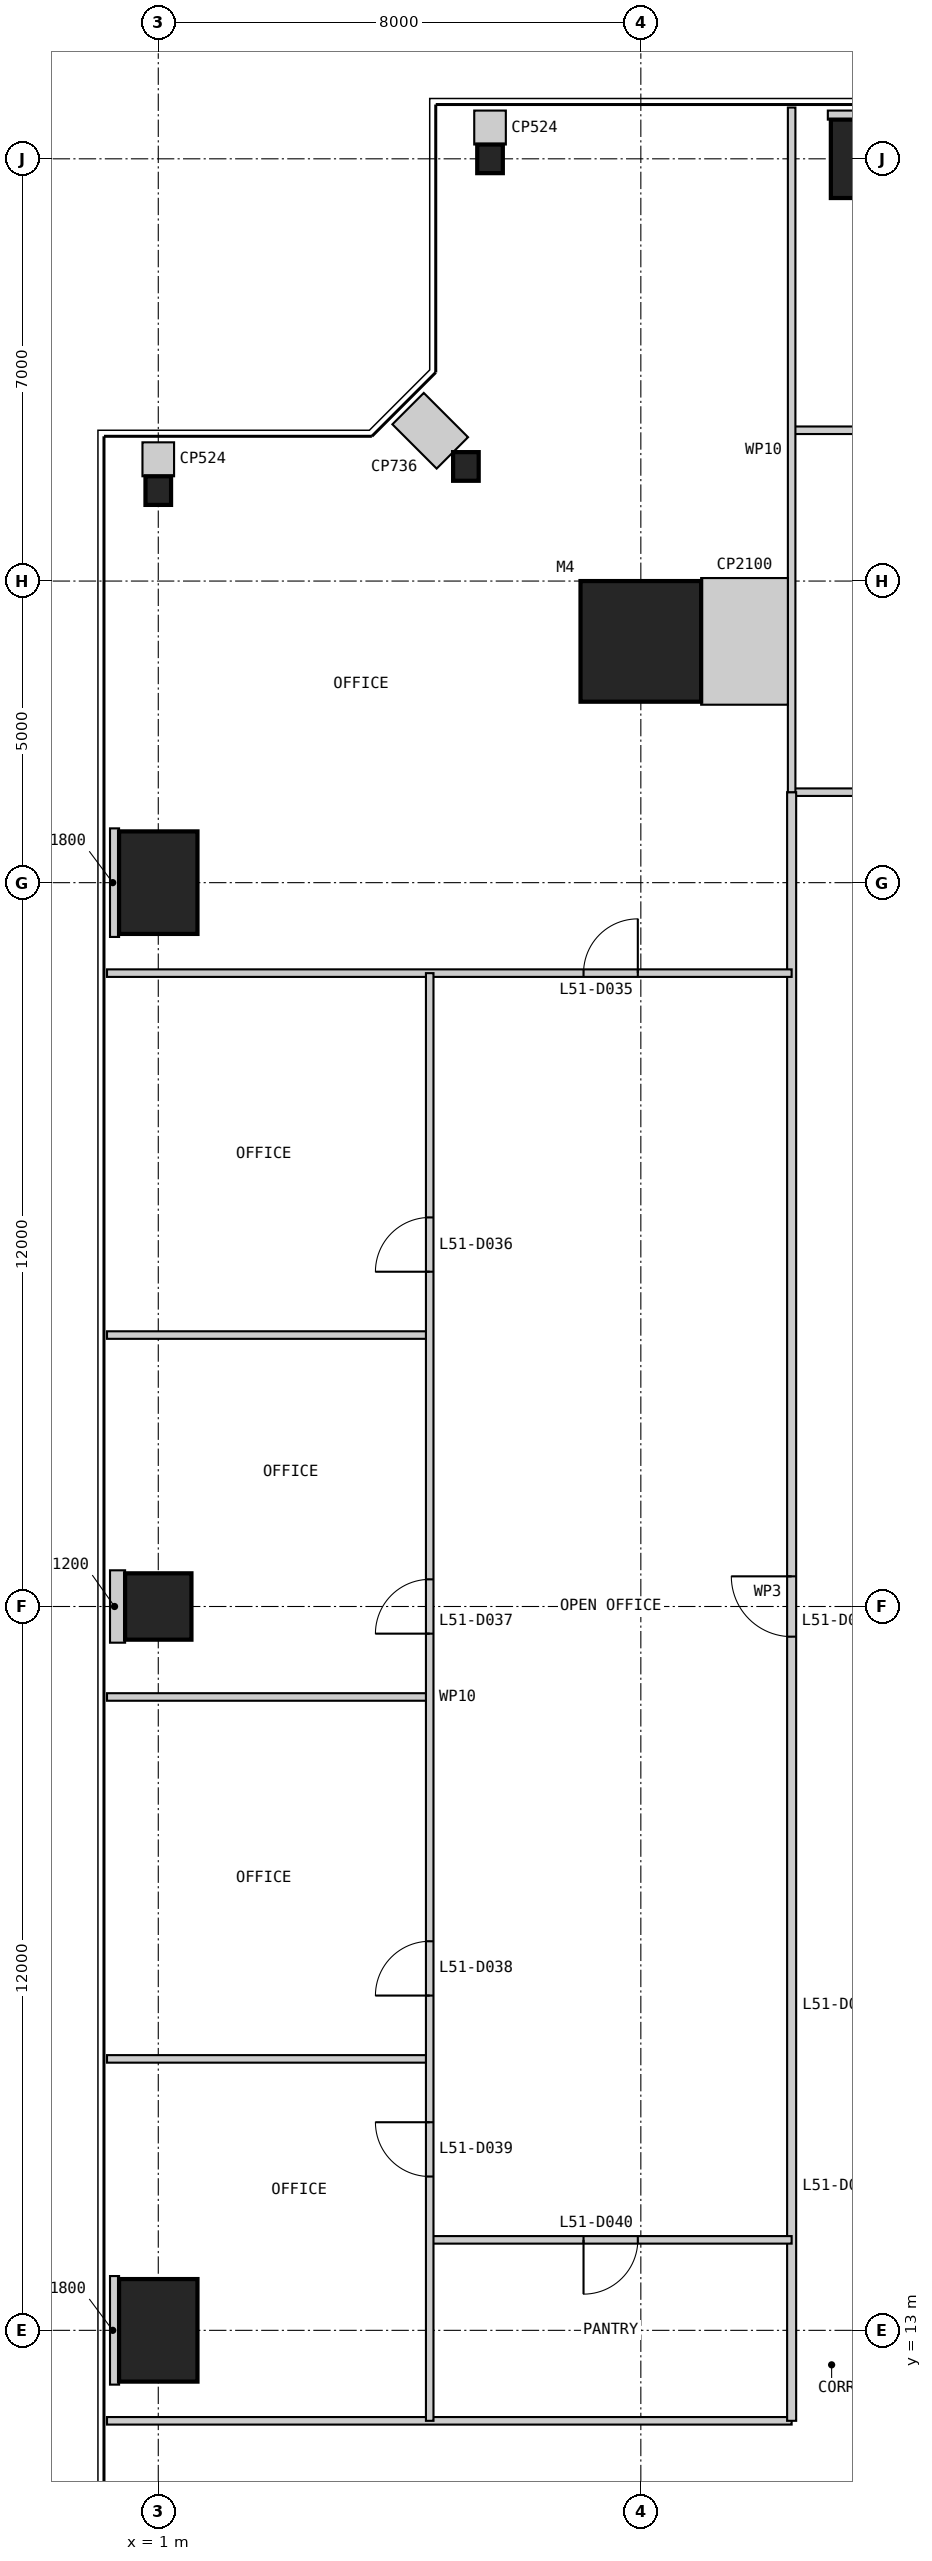
"""IFC4 building model, lengths in metres.
Left out: names, types, materials, properties, quantities, classifications, styles, units other than length and angle.
Written with IfcOpenShell. Run it as: python <this file> out.ifc"""

import sys

from ifc_helpers import new_model, si_unit, direction, frame, frame_2d, origin, origin_2d, place, context, subcontext, project, spatial, rectangle, i_section, extrude, element, fill, save


model = new_model("IFC4")
c1 = context("Model", 3, precision=1e-05, world=origin(), true_north=direction((0.0, 1.0)))
c2 = subcontext(c1, "Body", "Model", "MODEL_VIEW")
j1 = project(units=[si_unit("LENGTHUNIT", "METRE"), si_unit("PLANEANGLEUNIT", "RADIAN")], contexts=[c1])
p1 = place(None, origin())
s1 = spatial("IfcSite", under=j1, at=p1, CompositionType="ELEMENT")
p2 = place(p1, origin())
s2 = spatial("IfcBuilding", under=s1, at=p2, CompositionType="ELEMENT")
p3 = place(p2, frame((0.0, 0.0, 217.8)))
s3 = spatial("IfcBuildingStorey", under=s2, at=p3, CompositionType="ELEMENT", Elevation=217.8)
p4 = place(p3, frame((9.0, 41.0, 0.0), z_axis=(0.0, 0.0, 1.0), x_axis=(1.0, 0.0, 0.0)))
e1 = element("IfcColumn", 1, at=p4, inside=s3, PredefinedType="COLUMN", context=c2, shape_type="SweptSolid", body=[
    extrude(rectangle(XDim=2.0, YDim=2.0, at=origin_2d()), origin(), (0.0, 0.0, 1.0), 4.0),
])
p5 = place(p3, frame((13.0, 49.0, 0.0), z_axis=(0.0, 0.0, 1.0), x_axis=(1.0, 0.0, 0.0)))
e2 = element("IfcColumn", 2, at=p5, inside=s3, PredefinedType="COLUMN", context=c2, shape_type="SweptSolid", body=[
    extrude(rectangle(XDim=1.7, YDim=1.3, at=origin_2d()), origin(), (0.0, 0.0, 1.0), 4.0),
])
for number, where, z_axis, x_axis in (
    (3, (6.5, 49.0, 0.0), (0.0, 0.0, 1.0), (1.0, 0.0, 0.0)),
    (4, (6.1, 43.9, 0.0), (0.0, 0.0, 1.0), (1.0, 0.0, 0.0)),
    (5, (1.0, 43.5, 0.0), (0.0, 0.0, 1.0), (1.0, 0.0, 0.0)),
):
    element("IfcColumn", number, at=place(p3, frame(where, z_axis=z_axis, x_axis=x_axis)), inside=s3, PredefinedType="COLUMN", context=c2, shape_type="SweptSolid", body=[
        extrude(i_section(OverallWidth=0.424, OverallDepth=0.475, WebThickness=0.048, FlangeThickness=0.077, at=origin_2d()), origin(), (0.0, 0.0, 1.0), 4.0),
    ])
p6 = place(p3, frame((1.0, 37.0, 0.0), z_axis=(0.0, 0.0, 1.0), x_axis=(1.0, 0.0, 0.0)))
e6 = element("IfcColumn", 6, at=p6, inside=s3, PredefinedType="COLUMN", context=c2, shape_type="SweptSolid", body=[
    extrude(rectangle(XDim=1.3, YDim=1.7, at=origin_2d()), origin(), (0.0, 0.0, 1.0), 4.0),
])
p7 = place(p3, frame((1.0, 25.0, 0.0), z_axis=(0.0, 0.0, 1.0), x_axis=(1.0, 0.0, 0.0)))
e7 = element("IfcColumn", 7, at=p7, inside=s3, PredefinedType="COLUMN", context=c2, shape_type="SweptSolid", body=[
    extrude(rectangle(XDim=1.1, YDim=1.1, at=origin_2d()), origin(), (0.0, 0.0, 1.0), 4.0),
])
p8 = place(p3, frame((1.0, 13.0, 0.0), z_axis=(0.0, 0.0, 1.0), x_axis=(1.0, 0.0, 0.0)))
e8 = element("IfcColumn", 8, at=p8, inside=s3, PredefinedType="COLUMN", context=c2, shape_type="SweptSolid", body=[
    extrude(rectangle(XDim=1.3, YDim=1.7, at=origin_2d()), origin(), (0.0, 0.0, 1.0), 4.0),
])
p9 = place(p3, frame((0.15, 11.5, 0.0), z_axis=(0.0, 0.0, 1.0), x_axis=(1.0, 0.0, 0.0)))
e9 = element("IfcWall", 9, at=p9, inside=s3, PredefinedType="PARTITIONING", context=c2, shape_type="SweptSolid", body=[
    extrude(rectangle(XDim=11.35, YDim=0.125, at=frame_2d((5.675, 0.0))), origin(), (0.0, 0.0, 1.0), 3.85),
])
p10 = place(p3, frame((17.5, 44.5, 0.0), z_axis=(0.0, 0.0, 1.0), x_axis=(-1.0, 0.0, 0.0)))
e10 = element("IfcWall", 10, at=p10, inside=s3, PredefinedType="PARTITIONING", context=c2, shape_type="SweptSolid", body=[
    extrude(rectangle(XDim=6.0, YDim=0.125, at=frame_2d((3.0, 0.0))), origin(), (0.0, 0.0, 1.0), 3.85),
])
p11 = place(p3, frame((14.5, 38.5, 0.0), z_axis=(0.0, 0.0, 1.0), x_axis=(-1.0, 0.0, 0.0)))
e11 = element("IfcWall", 11, at=p11, inside=s3, PredefinedType="PARTITIONING", context=c2, shape_type="SweptSolid", body=[
    extrude(rectangle(XDim=3.0, YDim=0.125, at=frame_2d((1.5, 0.0))), origin(), (0.0, 0.0, 1.0), 3.85),
])
p12 = place(p3, frame((11.5, 38.5, 0.0), z_axis=(0.0, 0.0, 1.0), x_axis=(0.0, -1.0, 0.0)))
e12 = element("IfcWall", 12, at=p12, inside=s3, PredefinedType="PARTITIONING", context=c2, shape_type="SweptSolid", body=[
    extrude(rectangle(XDim=27.0, YDim=0.15, at=frame_2d((13.5, 0.0))), origin(), (0.0, 0.0, 1.0), 3.85),
])
p13 = place(p12, frame((13.0, 0.0, 0.0)))
e13 = element("IfcOpeningElement", 13, at=p13, cuts=e12, PredefinedType="OPENING", context=c2, shape_type="SweptSolid", body=[
    extrude(rectangle(XDim=1.0, YDim=2.2, at=frame_2d((0.5, 1.1))), frame((0.0, 0.085, 0.0), z_axis=(0.0, -1.0, 0.0), x_axis=(1.0, 0.0, 0.0)), (0.0, 0.0, 1.0), 0.17),
])
p14 = place(p3, frame((11.5, 49.85, 0.0), z_axis=(0.0, 0.0, 1.0), x_axis=(0.0, -1.0, 0.0)))
e14 = element("IfcWall", 14, at=p14, inside=s3, PredefinedType="PARTITIONING", context=c2, shape_type="SweptSolid", body=[
    extrude(rectangle(XDim=11.35, YDim=0.125, at=frame_2d((5.675, 0.0))), origin(), (0.0, 0.0, 1.0), 3.85),
])
p15 = place(p3, frame((0.15, 35.5, 0.0), z_axis=(0.0, 0.0, 1.0), x_axis=(1.0, 0.0, 0.0)))
e15 = element("IfcWall", 15, at=p15, inside=s3, PredefinedType="PARTITIONING", context=c2, shape_type="SweptSolid", body=[
    extrude(rectangle(XDim=11.35, YDim=0.125, at=frame_2d((5.675, 0.0))), origin(), (0.0, 0.0, 1.0), 3.85),
])
p16 = place(p15, frame((7.9, 0.0, 0.0)))
e16 = element("IfcOpeningElement", 16, at=p16, cuts=e15, PredefinedType="OPENING", context=c2, shape_type="SweptSolid", body=[
    extrude(rectangle(XDim=0.9, YDim=2.2, at=frame_2d((0.45, 1.1))), frame((0.0, 0.073, 0.0), z_axis=(0.0, -1.0, 0.0), x_axis=(1.0, 0.0, 0.0)), (0.0, 0.0, 1.0), 0.145),
])
for number, where, z_axis, x_axis in (
    (17, (0.15, 29.5, 0.0), (0.0, 0.0, 1.0), (1.0, 0.0, 0.0)),
    (18, (0.15, 23.5, 0.0), (0.0, 0.0, 1.0), (1.0, 0.0, 0.0)),
    (19, (0.15, 17.5, 0.0), (0.0, 0.0, 1.0), (1.0, 0.0, 0.0)),
):
    element("IfcWall", number, at=place(p3, frame(where, z_axis=z_axis, x_axis=x_axis)), inside=s3, PredefinedType="PARTITIONING", context=c2, shape_type="SweptSolid", body=[
        extrude(rectangle(XDim=5.35, YDim=0.125, at=frame_2d((2.675, 0.0))), origin(), (0.0, 0.0, 1.0), 3.85),
    ])
p17 = place(p3, frame((5.5, 14.5, 0.0), z_axis=(0.0, 0.0, 1.0), x_axis=(1.0, 0.0, 0.0)))
e20 = element("IfcWall", 20, at=p17, inside=s3, PredefinedType="PARTITIONING", context=c2, shape_type="SweptSolid", body=[
    extrude(rectangle(XDim=6.0, YDim=0.125, at=frame_2d((3.0, 0.0))), origin(), (0.0, 0.0, 1.0), 3.85),
])
p18 = place(p17, frame((2.55, 0.0, 0.0)))
e21 = element("IfcOpeningElement", 21, at=p18, cuts=e20, PredefinedType="OPENING", context=c2, shape_type="SweptSolid", body=[
    extrude(rectangle(XDim=0.9, YDim=2.2, at=frame_2d((0.45, 1.1))), frame((0.0, 0.073, 0.0), z_axis=(0.0, -1.0, 0.0), x_axis=(1.0, 0.0, 0.0)), (0.0, 0.0, 1.0), 0.145),
])
p19 = place(p3, frame((5.5, 35.5, 0.0), z_axis=(0.0, 0.0, 1.0), x_axis=(0.0, -1.0, 0.0)))
e22 = element("IfcWall", 22, at=p19, inside=s3, PredefinedType="PARTITIONING", context=c2, shape_type="SweptSolid", body=[
    extrude(rectangle(XDim=24.0, YDim=0.125, at=frame_2d((12.0, 0.0))), origin(), (0.0, 0.0, 1.0), 3.85),
])
p20 = place(p19, frame((4.05, 0.0, 0.0)))
e23 = element("IfcOpeningElement", 23, at=p20, cuts=e22, PredefinedType="OPENING", context=c2, shape_type="SweptSolid", body=[
    extrude(rectangle(XDim=0.9, YDim=2.2, at=frame_2d((0.45, 1.1))), frame((0.0, 0.073, 0.0), z_axis=(0.0, -1.0, 0.0), x_axis=(1.0, 0.0, 0.0)), (0.0, 0.0, 1.0), 0.145),
])
p21 = place(p19, frame((10.05, 0.0, 0.0)))
e24 = element("IfcOpeningElement", 24, at=p21, cuts=e22, PredefinedType="OPENING", context=c2, shape_type="SweptSolid", body=[
    extrude(rectangle(XDim=0.9, YDim=2.2, at=frame_2d((0.45, 1.1))), frame((0.0, 0.073, 0.0), z_axis=(0.0, -1.0, 0.0), x_axis=(1.0, 0.0, 0.0)), (0.0, 0.0, 1.0), 0.145),
])
p22 = place(p19, frame((16.05, 0.0, 0.0)))
e25 = element("IfcOpeningElement", 25, at=p22, cuts=e22, PredefinedType="OPENING", context=c2, shape_type="SweptSolid", body=[
    extrude(rectangle(XDim=0.9, YDim=2.2, at=frame_2d((0.45, 1.1))), frame((0.0, 0.073, 0.0), z_axis=(0.0, -1.0, 0.0), x_axis=(1.0, 0.0, 0.0)), (0.0, 0.0, 1.0), 0.145),
])
p23 = place(p19, frame((19.05, 0.0, 0.0)))
e26 = element("IfcOpeningElement", 26, at=p23, cuts=e22, PredefinedType="OPENING", context=c2, shape_type="SweptSolid", body=[
    extrude(rectangle(XDim=0.9, YDim=2.2, at=frame_2d((0.45, 1.1))), frame((0.0, 0.073, 0.0), z_axis=(0.0, -1.0, 0.0), x_axis=(1.0, 0.0, 0.0)), (0.0, 0.0, 1.0), 0.145),
])
p24 = place(p3, frame((13.0, 49.8, 0.0), z_axis=(0.0, 0.0, 1.0), x_axis=(0.0, -1.0, 0.0)))
e27 = element("IfcWall", 27, at=p24, inside=s3, PredefinedType="PARTITIONING", context=c2, shape_type="SweptSolid", body=[
    extrude(rectangle(XDim=0.15, YDim=1.8, at=frame_2d((0.075, 0.0))), origin(), (0.0, 0.0, 1.0), 3.85),
])
p25 = place(p3, frame((11.438, 41.0, 0.0), z_axis=(0.0, 0.0, 1.0), x_axis=(-1.0, 0.0, 0.0)))
e28 = element("IfcWall", 28, at=p25, inside=s3, PredefinedType="PARTITIONING", context=c2, shape_type="SweptSolid", body=[
    extrude(rectangle(XDim=1.438, YDim=2.1, at=frame_2d((0.719, 0.0))), origin(), (0.0, 0.0, 1.0), 3.85),
])
p26 = place(p3, frame((6.5, 49.8, 0.0), z_axis=(0.0, 0.0, 1.0), x_axis=(0.0, -1.0, 0.0)))
e29 = element("IfcWall", 29, at=p26, inside=s3, PredefinedType="PARTITIONING", context=c2, shape_type="SweptSolid", body=[
    extrude(rectangle(XDim=0.562, YDim=0.524, at=frame_2d((0.281, 0.0))), origin(), (0.0, 0.0, 1.0), 3.85),
])
p27 = place(p3, frame((5.141, 44.859, 0.0), z_axis=(0.0, 0.0, 1.0), x_axis=(0.707106781187, -0.707106781187, 0.0)))
e30 = element("IfcWall", 30, at=p27, inside=s3, PredefinedType="PARTITIONING", context=c2, shape_type="SweptSolid", body=[
    extrude(rectangle(XDim=1.038, YDim=0.736, at=frame_2d((0.519, 0.0))), origin(), (0.0, 0.0, 1.0), 3.85),
])
p28 = place(p3, frame((1.0, 44.3, 0.0), z_axis=(0.0, 0.0, 1.0), x_axis=(0.0, -1.0, 0.0)))
e31 = element("IfcWall", 31, at=p28, inside=s3, PredefinedType="PARTITIONING", context=c2, shape_type="SweptSolid", body=[
    extrude(rectangle(XDim=0.562, YDim=0.524, at=frame_2d((0.281, 0.0))), origin(), (0.0, 0.0, 1.0), 3.85),
])
p29 = place(p3, frame((0.2, 37.0, 0.0), z_axis=(0.0, 0.0, 1.0), x_axis=(1.0, 0.0, 0.0)))
e32 = element("IfcWall", 32, at=p29, inside=s3, PredefinedType="PARTITIONING", context=c2, shape_type="SweptSolid", body=[
    extrude(rectangle(XDim=0.15, YDim=1.8, at=frame_2d((0.075, 0.0))), origin(), (0.0, 0.0, 1.0), 3.85),
])
p30 = place(p3, frame((0.2, 25.0, 0.0), z_axis=(0.0, 0.0, 1.0), x_axis=(1.0, 0.0, 0.0)))
e33 = element("IfcWall", 33, at=p30, inside=s3, PredefinedType="PARTITIONING", context=c2, shape_type="SweptSolid", body=[
    extrude(rectangle(XDim=0.25, YDim=1.2, at=frame_2d((0.125, 0.0))), origin(), (0.0, 0.0, 1.0), 3.85),
])
p31 = place(p3, frame((0.2, 13.0, 0.0), z_axis=(0.0, 0.0, 1.0), x_axis=(1.0, 0.0, 0.0)))
e34 = element("IfcWall", 34, at=p31, inside=s3, PredefinedType="PARTITIONING", context=c2, shape_type="SweptSolid", body=[
    extrude(rectangle(XDim=0.15, YDim=1.8, at=frame_2d((0.075, 0.0))), origin(), (0.0, 0.0, 1.0), 3.85),
])
p32 = place(p13, frame((1.0, 0.0, 0.0), z_axis=(0.0, 0.0, 1.0), x_axis=(-1.0, 0.0, 0.0)))
e35 = element("IfcDoor", 35, at=p32, inside=s3, OperationType="SINGLE_SWING_RIGHT", PredefinedType="DOOR", context=c2, shape_type="SweptSolid", body=[
    extrude(rectangle(XDim=1.0, YDim=2.2, at=frame_2d((0.5, 1.1))), frame((0.0, 0.025, 0.0), z_axis=(0.0, -1.0, 0.0), x_axis=(1.0, 0.0, 0.0)), (0.0, 0.0, 1.0), 0.05),
])
fill(e13, e35)
p33 = place(p16, origin())
e36 = element("IfcDoor", 36, at=p33, inside=s3, OperationType="SINGLE_SWING_RIGHT", PredefinedType="DOOR", context=c2, shape_type="SweptSolid", body=[
    extrude(rectangle(XDim=0.9, YDim=2.2, at=frame_2d((0.45, 1.1))), frame((0.0, 0.025, 0.0), z_axis=(0.0, -1.0, 0.0), x_axis=(1.0, 0.0, 0.0)), (0.0, 0.0, 1.0), 0.05),
])
fill(e16, e36)
p34 = place(p20, frame((0.9, 0.0, 0.0), z_axis=(0.0, 0.0, 1.0), x_axis=(-1.0, 0.0, 0.0)))
e37 = element("IfcDoor", 37, at=p34, inside=s3, OperationType="SINGLE_SWING_LEFT", PredefinedType="DOOR", context=c2, shape_type="SweptSolid", body=[
    extrude(rectangle(XDim=0.9, YDim=2.2, at=frame_2d((0.45, 1.1))), frame((0.0, 0.025, 0.0), z_axis=(0.0, -1.0, 0.0), x_axis=(1.0, 0.0, 0.0)), (0.0, 0.0, 1.0), 0.05),
])
fill(e23, e37)
p35 = place(p21, frame((0.9, 0.0, 0.0), z_axis=(0.0, 0.0, 1.0), x_axis=(-1.0, 0.0, 0.0)))
e38 = element("IfcDoor", 38, at=p35, inside=s3, OperationType="SINGLE_SWING_LEFT", PredefinedType="DOOR", context=c2, shape_type="SweptSolid", body=[
    extrude(rectangle(XDim=0.9, YDim=2.2, at=frame_2d((0.45, 1.1))), frame((0.0, 0.025, 0.0), z_axis=(0.0, -1.0, 0.0), x_axis=(1.0, 0.0, 0.0)), (0.0, 0.0, 1.0), 0.05),
])
fill(e24, e38)
p36 = place(p22, frame((0.9, 0.0, 0.0), z_axis=(0.0, 0.0, 1.0), x_axis=(-1.0, 0.0, 0.0)))
e39 = element("IfcDoor", 39, at=p36, inside=s3, OperationType="SINGLE_SWING_LEFT", PredefinedType="DOOR", context=c2, shape_type="SweptSolid", body=[
    extrude(rectangle(XDim=0.9, YDim=2.2, at=frame_2d((0.45, 1.1))), frame((0.0, 0.025, 0.0), z_axis=(0.0, -1.0, 0.0), x_axis=(1.0, 0.0, 0.0)), (0.0, 0.0, 1.0), 0.05),
])
fill(e25, e39)
p37 = place(p23, frame((0.9, 0.0, 0.0), z_axis=(0.0, 0.0, 1.0), x_axis=(-1.0, 0.0, 0.0)))
e40 = element("IfcDoor", 40, at=p37, inside=s3, OperationType="SINGLE_SWING_RIGHT", PredefinedType="DOOR", context=c2, shape_type="SweptSolid", body=[
    extrude(rectangle(XDim=0.9, YDim=2.2, at=frame_2d((0.45, 1.1))), frame((0.0, 0.025, 0.0), z_axis=(0.0, -1.0, 0.0), x_axis=(1.0, 0.0, 0.0)), (0.0, 0.0, 1.0), 0.05),
])
fill(e26, e40)
p38 = place(p18, frame((0.9, 0.0, 0.0), z_axis=(0.0, 0.0, 1.0), x_axis=(-1.0, 0.0, 0.0)))
e41 = element("IfcDoor", 41, at=p38, inside=s3, OperationType="SINGLE_SWING_RIGHT", PredefinedType="DOOR", context=c2, shape_type="SweptSolid", body=[
    extrude(rectangle(XDim=0.9, YDim=2.2, at=frame_2d((0.45, 1.1))), frame((0.0, 0.025, 0.0), z_axis=(0.0, -1.0, 0.0), x_axis=(1.0, 0.0, 0.0)), (0.0, 0.0, 1.0), 0.05),
])
fill(e21, e41)
save(model, sys.argv[1])
